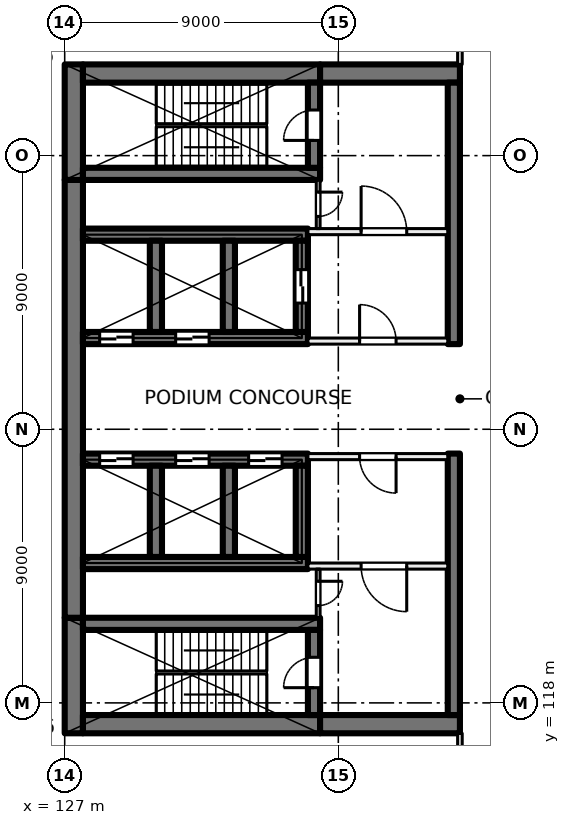
"""IFC4 building model, lengths in metres.
Left out: names, types, materials, properties, quantities, classifications, styles, units other than length and angle.
Written with IfcOpenShell. Run it as: python <this file> out.ifc"""

import sys

from ifc_helpers import new_model, si_unit, direction, frame, frame_2d, origin, place, context, subcontext, project, spatial, rectangle, extrude, element, fill, save


model = new_model("IFC4")
c1 = context("Model", 3, precision=1e-05, world=origin(), true_north=direction((0.0, 1.0)))
c2 = subcontext(c1, "Body", "Model", "MODEL_VIEW")
j1 = project(units=[si_unit("LENGTHUNIT", "METRE"), si_unit("PLANEANGLEUNIT", "RADIAN")], contexts=[c1])
p1 = place(None, origin())
s1 = spatial("IfcSite", under=j1, at=p1, CompositionType="ELEMENT")
p2 = place(p1, origin())
s2 = spatial("IfcBuilding", under=s1, at=p2, CompositionType="ELEMENT")
p3 = place(p2, frame((0.0, 0.0, 7.5)))
s3 = spatial("IfcBuildingStorey", under=s2, at=p3, CompositionType="ELEMENT", Elevation=7.5)
p4 = place(p3, frame((127.3, 117.0, 0.0), z_axis=(0.0, 0.0, 1.0), x_axis=(0.0, 1.0, 0.0)))
e1 = element("IfcWall", 1, at=p4, inside=s3, PredefinedType="SHEAR", context=c2, shape_type="SweptSolid", body=[
    extrude(rectangle(XDim=3.8, YDim=0.6, at=frame_2d((1.9, 0.0))), origin(), (0.0, 0.0, 1.0), 5.0),
])
p5 = place(p3, frame((127.3, 120.8, 0.0), z_axis=(0.0, 0.0, 1.0), x_axis=(0.0, 1.0, 0.0)))
e2 = element("IfcWall", 2, at=p5, inside=s3, PredefinedType="SHEAR", context=c2, shape_type="SweptSolid", body=[
    extrude(rectangle(XDim=14.4, YDim=0.6, at=frame_2d((7.2, 0.0))), origin(), (0.0, 0.0, 1.0), 5.0),
])
p6 = place(p3, frame((127.3, 135.2, 0.0), z_axis=(0.0, 0.0, 1.0), x_axis=(0.0, 1.0, 0.0)))
e3 = element("IfcWall", 3, at=p6, inside=s3, PredefinedType="SHEAR", context=c2, shape_type="SweptSolid", body=[
    extrude(rectangle(XDim=3.8, YDim=0.6, at=frame_2d((1.9, 0.0))), origin(), (0.0, 0.0, 1.0), 5.0),
])
for number, where, z_axis, x_axis in (
    (4, (127.6, 117.3, 0.0), (0.0, 0.0, 1.0), (1.0, 0.0, 0.0)),
    (5, (127.6, 138.7, 0.0), (0.0, 0.0, 1.0), (1.0, 0.0, 0.0)),
):
    element("IfcWall", number, at=place(p3, frame(where, z_axis=z_axis, x_axis=x_axis)), inside=s3, PredefinedType="SHEAR", context=c2, shape_type="SweptSolid", body=[
        extrude(rectangle(XDim=7.8, YDim=0.6, at=frame_2d((3.9, 0.0))), origin(), (0.0, 0.0, 1.0), 5.0),
    ])
for number, where, z_axis, x_axis in (
    (6, (135.4, 117.3, 0.0), (0.0, 0.0, 1.0), (1.0, 0.0, 0.0)),
    (7, (135.4, 138.7, 0.0), (0.0, 0.0, 1.0), (1.0, 0.0, 0.0)),
):
    element("IfcWall", number, at=place(p3, frame(where, z_axis=z_axis, x_axis=x_axis)), inside=s3, PredefinedType="SHEAR", context=c2, shape_type="SweptSolid", body=[
        extrude(rectangle(XDim=4.6, YDim=0.6, at=frame_2d((2.3, 0.0))), origin(), (0.0, 0.0, 1.0), 5.0),
    ])
p7 = place(p3, frame((127.6, 120.6, 0.0), z_axis=(0.0, 0.0, 1.0), x_axis=(1.0, 0.0, 0.0)))
e8 = element("IfcWall", 8, at=p7, inside=s3, PredefinedType="SHEAR", context=c2, shape_type="SweptSolid", body=[
    extrude(rectangle(XDim=7.8, YDim=0.4, at=frame_2d((3.9, 0.0))), origin(), (0.0, 0.0, 1.0), 5.0),
])
p8 = place(p3, frame((135.2, 117.6, 0.0), z_axis=(0.0, 0.0, 1.0), x_axis=(0.0, 1.0, 0.0)))
e9 = element("IfcWall", 9, at=p8, inside=s3, PredefinedType="SHEAR", context=c2, shape_type="SweptSolid", body=[
    extrude(rectangle(XDim=2.8, YDim=0.4, at=frame_2d((1.4, 0.0))), origin(), (0.0, 0.0, 1.0), 5.0),
])
p9 = place(p8, frame((0.9, 0.0, 0.0)))
e10 = element("IfcOpeningElement", 10, at=p9, cuts=e9, PredefinedType="OPENING", context=c2, shape_type="SweptSolid", body=[
    extrude(rectangle(XDim=1.0, YDim=2.1, at=frame_2d((0.5, 1.05))), frame((0.0, 0.21, 0.0), z_axis=(0.0, -1.0, 0.0), x_axis=(1.0, 0.0, 0.0)), (0.0, 0.0, 1.0), 0.42),
])
p10 = place(p3, frame((127.6, 135.4, 0.0), z_axis=(0.0, 0.0, 1.0), x_axis=(1.0, 0.0, 0.0)))
e11 = element("IfcWall", 11, at=p10, inside=s3, PredefinedType="SHEAR", context=c2, shape_type="SweptSolid", body=[
    extrude(rectangle(XDim=7.8, YDim=0.4, at=frame_2d((3.9, 0.0))), origin(), (0.0, 0.0, 1.0), 5.0),
])
p11 = place(p3, frame((135.2, 135.6, 0.0), z_axis=(0.0, 0.0, 1.0), x_axis=(0.0, 1.0, 0.0)))
e12 = element("IfcWall", 12, at=p11, inside=s3, PredefinedType="SHEAR", context=c2, shape_type="SweptSolid", body=[
    extrude(rectangle(XDim=2.8, YDim=0.4, at=frame_2d((1.4, 0.0))), origin(), (0.0, 0.0, 1.0), 5.0),
])
p12 = place(p11, frame((0.9, 0.0, 0.0)))
e13 = element("IfcOpeningElement", 13, at=p12, cuts=e12, PredefinedType="OPENING", context=c2, shape_type="SweptSolid", body=[
    extrude(rectangle(XDim=1.0, YDim=2.1, at=frame_2d((0.5, 1.05))), frame((0.0, 0.21, 0.0), z_axis=(0.0, -1.0, 0.0), x_axis=(1.0, 0.0, 0.0)), (0.0, 0.0, 1.0), 0.42),
])
p13 = place(p3, frame((127.6, 126.0, 0.0), z_axis=(0.0, 0.0, 1.0), x_axis=(1.0, 0.0, 0.0)))
e14 = element("IfcWall", 14, at=p13, inside=s3, PredefinedType="SHEAR", context=c2, shape_type="SweptSolid", body=[
    extrude(rectangle(XDim=7.4, YDim=0.4, at=frame_2d((3.7, 0.0))), origin(), (0.0, 0.0, 1.0), 5.0),
])
p14 = place(p13, frame((0.55, 0.0, 0.0)))
e15 = element("IfcOpeningElement", 15, at=p14, cuts=e14, PredefinedType="OPENING", context=c2, shape_type="SweptSolid", body=[
    extrude(rectangle(XDim=1.1, YDim=2.1, at=frame_2d((0.55, 1.05))), frame((0.0, 0.21, 0.0), z_axis=(0.0, -1.0, 0.0), x_axis=(1.0, 0.0, 0.0)), (0.0, 0.0, 1.0), 0.42),
])
p15 = place(p13, frame((3.05, 0.0, 0.0)))
e16 = element("IfcOpeningElement", 16, at=p15, cuts=e14, PredefinedType="OPENING", context=c2, shape_type="SweptSolid", body=[
    extrude(rectangle(XDim=1.1, YDim=2.1, at=frame_2d((0.55, 1.05))), frame((0.0, 0.21, 0.0), z_axis=(0.0, -1.0, 0.0), x_axis=(1.0, 0.0, 0.0)), (0.0, 0.0, 1.0), 0.42),
])
p16 = place(p13, frame((5.45, 0.0, 0.0)))
e17 = element("IfcOpeningElement", 17, at=p16, cuts=e14, PredefinedType="OPENING", context=c2, shape_type="SweptSolid", body=[
    extrude(rectangle(XDim=1.1, YDim=2.1, at=frame_2d((0.55, 1.05))), frame((0.0, 0.21, 0.0), z_axis=(0.0, -1.0, 0.0), x_axis=(1.0, 0.0, 0.0)), (0.0, 0.0, 1.0), 0.42),
])
p17 = place(p3, frame((127.6, 122.6, 0.0), z_axis=(0.0, 0.0, 1.0), x_axis=(1.0, 0.0, 0.0)))
e18 = element("IfcWall", 18, at=p17, inside=s3, PredefinedType="SHEAR", context=c2, shape_type="SweptSolid", body=[
    extrude(rectangle(XDim=7.4, YDim=0.4, at=frame_2d((3.7, 0.0))), origin(), (0.0, 0.0, 1.0), 5.0),
])
for number, where, z_axis, x_axis in (
    (19, (130.0, 122.8, 0.0), (0.0, 0.0, 1.0), (0.0, 1.0, 0.0)),
    (20, (132.4, 122.8, 0.0), (0.0, 0.0, 1.0), (0.0, 1.0, 0.0)),
    (21, (134.8, 122.8, 0.0), (0.0, 0.0, 1.0), (0.0, 1.0, 0.0)),
):
    element("IfcWall", number, at=place(p3, frame(where, z_axis=z_axis, x_axis=x_axis)), inside=s3, PredefinedType="SHEAR", context=c2, shape_type="SweptSolid", body=[
        extrude(rectangle(XDim=3.0, YDim=0.4, at=frame_2d((1.5, 0.0))), origin(), (0.0, 0.0, 1.0), 5.0),
    ])
p18 = place(p3, frame((127.6, 130.0, 0.0), z_axis=(0.0, 0.0, 1.0), x_axis=(1.0, 0.0, 0.0)))
e22 = element("IfcWall", 22, at=p18, inside=s3, PredefinedType="SHEAR", context=c2, shape_type="SweptSolid", body=[
    extrude(rectangle(XDim=7.4, YDim=0.4, at=frame_2d((3.7, 0.0))), origin(), (0.0, 0.0, 1.0), 5.0),
])
p19 = place(p18, frame((0.55, 0.0, 0.0)))
e23 = element("IfcOpeningElement", 23, at=p19, cuts=e22, PredefinedType="OPENING", context=c2, shape_type="SweptSolid", body=[
    extrude(rectangle(XDim=1.1, YDim=2.1, at=frame_2d((0.55, 1.05))), frame((0.0, 0.21, 0.0), z_axis=(0.0, -1.0, 0.0), x_axis=(1.0, 0.0, 0.0)), (0.0, 0.0, 1.0), 0.42),
])
p20 = place(p18, frame((3.05, 0.0, 0.0)))
e24 = element("IfcOpeningElement", 24, at=p20, cuts=e22, PredefinedType="OPENING", context=c2, shape_type="SweptSolid", body=[
    extrude(rectangle(XDim=1.1, YDim=2.1, at=frame_2d((0.55, 1.05))), frame((0.0, 0.21, 0.0), z_axis=(0.0, -1.0, 0.0), x_axis=(1.0, 0.0, 0.0)), (0.0, 0.0, 1.0), 0.42),
])
p21 = place(p3, frame((127.6, 133.4, 0.0), z_axis=(0.0, 0.0, 1.0), x_axis=(1.0, 0.0, 0.0)))
e25 = element("IfcWall", 25, at=p21, inside=s3, PredefinedType="SHEAR", context=c2, shape_type="SweptSolid", body=[
    extrude(rectangle(XDim=7.4, YDim=0.4, at=frame_2d((3.7, 0.0))), origin(), (0.0, 0.0, 1.0), 5.0),
])
for number, where, z_axis, x_axis in (
    (26, (130.0, 130.2, 0.0), (0.0, 0.0, 1.0), (0.0, 1.0, 0.0)),
    (27, (132.4, 130.2, 0.0), (0.0, 0.0, 1.0), (0.0, 1.0, 0.0)),
):
    element("IfcWall", number, at=place(p3, frame(where, z_axis=z_axis, x_axis=x_axis)), inside=s3, PredefinedType="SHEAR", context=c2, shape_type="SweptSolid", body=[
        extrude(rectangle(XDim=3.0, YDim=0.4, at=frame_2d((1.5, 0.0))), origin(), (0.0, 0.0, 1.0), 5.0),
    ])
p22 = place(p3, frame((134.8, 130.2, 0.0), z_axis=(0.0, 0.0, 1.0), x_axis=(0.0, 1.0, 0.0)))
e28 = element("IfcWall", 28, at=p22, inside=s3, PredefinedType="SHEAR", context=c2, shape_type="SweptSolid", body=[
    extrude(rectangle(XDim=3.0, YDim=0.4, at=frame_2d((1.5, 0.0))), origin(), (0.0, 0.0, 1.0), 5.0),
])
p23 = place(p22, frame((0.95, 0.0, 0.0)))
e29 = element("IfcOpeningElement", 29, at=p23, cuts=e28, PredefinedType="OPENING", context=c2, shape_type="SweptSolid", body=[
    extrude(rectangle(XDim=1.1, YDim=2.1, at=frame_2d((0.55, 1.05))), frame((0.0, 0.21, 0.0), z_axis=(0.0, -1.0, 0.0), x_axis=(1.0, 0.0, 0.0)), (0.0, 0.0, 1.0), 0.42),
])
for number, where, z_axis, x_axis in (
    (30, (139.8, 117.6, 0.0), (0.0, 0.0, 1.0), (0.0, 1.0, 0.0)),
    (31, (139.8, 129.8, 0.0), (0.0, 0.0, 1.0), (0.0, 1.0, 0.0)),
):
    element("IfcWall", number, at=place(p3, frame(where, z_axis=z_axis, x_axis=x_axis)), inside=s3, PredefinedType="SHEAR", context=c2, shape_type="SweptSolid", body=[
        extrude(rectangle(XDim=8.6, YDim=0.4, at=frame_2d((4.3, 0.0))), origin(), (0.0, 0.0, 1.0), 5.0),
    ])
p24 = place(p3, frame((135.0, 129.9, 0.0), z_axis=(0.0, 0.0, 1.0), x_axis=(1.0, 0.0, 0.0)))
e32 = element("IfcWall", 32, at=p24, inside=s3, PredefinedType="PARTITIONING", context=c2, shape_type="SweptSolid", body=[
    extrude(rectangle(XDim=4.6, YDim=0.2, at=frame_2d((2.3, 0.0))), origin(), (0.0, 0.0, 1.0), 4.6),
])
p25 = place(p24, frame((1.7, 0.0, 0.0)))
e33 = element("IfcOpeningElement", 33, at=p25, cuts=e32, PredefinedType="OPENING", context=c2, shape_type="SweptSolid", body=[
    extrude(rectangle(XDim=1.2, YDim=2.1, at=frame_2d((0.6, 1.05))), frame((0.0, 0.11, 0.0), z_axis=(0.0, -1.0, 0.0), x_axis=(1.0, 0.0, 0.0)), (0.0, 0.0, 1.0), 0.22),
])
p26 = place(p3, frame((135.0, 133.5, 0.0), z_axis=(0.0, 0.0, 1.0), x_axis=(1.0, 0.0, 0.0)))
e34 = element("IfcWall", 34, at=p26, inside=s3, PredefinedType="PARTITIONING", context=c2, shape_type="SweptSolid", body=[
    extrude(rectangle(XDim=4.6, YDim=0.2, at=frame_2d((2.3, 0.0))), origin(), (0.0, 0.0, 1.0), 4.6),
])
p27 = place(p26, frame((1.75, 0.0, 0.0)))
e35 = element("IfcOpeningElement", 35, at=p27, cuts=e34, PredefinedType="OPENING", context=c2, shape_type="SweptSolid", body=[
    extrude(rectangle(XDim=1.5, YDim=2.1, at=frame_2d((0.75, 1.05))), frame((0.0, 0.11, 0.0), z_axis=(0.0, -1.0, 0.0), x_axis=(1.0, 0.0, 0.0)), (0.0, 0.0, 1.0), 0.22),
])
p28 = place(p3, frame((135.337, 135.2, 0.0), z_axis=(0.0, 0.0, 1.0), x_axis=(0.0, -1.0, 0.0)))
e36 = element("IfcWall", 36, at=p28, inside=s3, PredefinedType="PARTITIONING", context=c2, shape_type="SweptSolid", body=[
    extrude(rectangle(XDim=1.6, YDim=0.125, at=frame_2d((0.8, 0.0))), origin(), (0.0, 0.0, 1.0), 4.6),
])
p29 = place(p28, frame((0.4, 0.0, 0.0)))
e37 = element("IfcOpeningElement", 37, at=p29, cuts=e36, PredefinedType="OPENING", context=c2, shape_type="SweptSolid", body=[
    extrude(rectangle(XDim=0.8, YDim=2.1, at=frame_2d((0.4, 1.05))), frame((0.0, 0.073, 0.0), z_axis=(0.0, -1.0, 0.0), x_axis=(1.0, 0.0, 0.0)), (0.0, 0.0, 1.0), 0.145),
])
p30 = place(p3, frame((139.6, 126.1, 0.0), z_axis=(0.0, 0.0, 1.0), x_axis=(-1.0, 0.0, 0.0)))
e38 = element("IfcWall", 38, at=p30, inside=s3, PredefinedType="PARTITIONING", context=c2, shape_type="SweptSolid", body=[
    extrude(rectangle(XDim=4.6, YDim=0.2, at=frame_2d((2.3, 0.0))), origin(), (0.0, 0.0, 1.0), 4.6),
])
p31 = place(p30, frame((1.7, 0.0, 0.0)))
e39 = element("IfcOpeningElement", 39, at=p31, cuts=e38, PredefinedType="OPENING", context=c2, shape_type="SweptSolid", body=[
    extrude(rectangle(XDim=1.2, YDim=2.1, at=frame_2d((0.6, 1.05))), frame((0.0, 0.11, 0.0), z_axis=(0.0, -1.0, 0.0), x_axis=(1.0, 0.0, 0.0)), (0.0, 0.0, 1.0), 0.22),
])
p32 = place(p3, frame((139.6, 122.5, 0.0), z_axis=(0.0, 0.0, 1.0), x_axis=(-1.0, 0.0, 0.0)))
e40 = element("IfcWall", 40, at=p32, inside=s3, PredefinedType="PARTITIONING", context=c2, shape_type="SweptSolid", body=[
    extrude(rectangle(XDim=4.6, YDim=0.2, at=frame_2d((2.3, 0.0))), origin(), (0.0, 0.0, 1.0), 4.6),
])
p33 = place(p32, frame((1.35, 0.0, 0.0)))
e41 = element("IfcOpeningElement", 41, at=p33, cuts=e40, PredefinedType="OPENING", context=c2, shape_type="SweptSolid", body=[
    extrude(rectangle(XDim=1.5, YDim=2.1, at=frame_2d((0.75, 1.05))), frame((0.0, 0.11, 0.0), z_axis=(0.0, -1.0, 0.0), x_axis=(1.0, 0.0, 0.0)), (0.0, 0.0, 1.0), 0.22),
])
p34 = place(p3, frame((135.337, 122.4, 0.0), z_axis=(0.0, 0.0, 1.0), x_axis=(0.0, -1.0, 0.0)))
e42 = element("IfcWall", 42, at=p34, inside=s3, PredefinedType="PARTITIONING", context=c2, shape_type="SweptSolid", body=[
    extrude(rectangle(XDim=1.6, YDim=0.125, at=frame_2d((0.8, 0.0))), origin(), (0.0, 0.0, 1.0), 4.6),
])
p35 = place(p34, frame((0.4, 0.0, 0.0)))
e43 = element("IfcOpeningElement", 43, at=p35, cuts=e42, PredefinedType="OPENING", context=c2, shape_type="SweptSolid", body=[
    extrude(rectangle(XDim=0.8, YDim=2.1, at=frame_2d((0.4, 1.05))), frame((0.0, 0.073, 0.0), z_axis=(0.0, -1.0, 0.0), x_axis=(1.0, 0.0, 0.0)), (0.0, 0.0, 1.0), 0.145),
])
p36 = place(p3, frame((140.0, 102.925, 0.0), z_axis=(0.0, 0.0, 1.0), x_axis=(0.0, 1.0, 0.0)))
e44 = element("IfcWall", 44, at=p36, inside=s3, PredefinedType="PARTITIONING", context=c2, shape_type="SweptSolid", body=[
    extrude(rectangle(XDim=14.075, YDim=0.15, at=frame_2d((7.038, 0.0))), origin(), (0.0, 0.0, 1.0), 4.6),
])
p37 = place(p36, frame((10.675, 0.0, 0.0)))
e45 = element("IfcOpeningElement", 45, at=p37, cuts=e44, PredefinedType="OPENING", context=c2, shape_type="SweptSolid", body=[
    extrude(rectangle(XDim=1.8, YDim=2.1, at=frame_2d((0.9, 1.05))), frame((0.0, 0.085, 0.0), z_axis=(0.0, -1.0, 0.0), x_axis=(1.0, 0.0, 0.0)), (0.0, 0.0, 1.0), 0.17),
])
p38 = place(p3, frame((140.0, 139.0, 0.0), z_axis=(0.0, 0.0, 1.0), x_axis=(0.0, 1.0, 0.0)))
e46 = element("IfcWall", 46, at=p38, inside=s3, PredefinedType="PARTITIONING", context=c2, shape_type="SweptSolid", body=[
    extrude(rectangle(XDim=14.4, YDim=0.15, at=frame_2d((7.2, 0.0))), origin(), (0.0, 0.0, 1.0), 4.6),
])
p39 = place(p19, origin())
e47 = element("IfcDoor", 47, at=p39, inside=s3, OperationType="DOUBLE_DOOR_SLIDING", PredefinedType="DOOR", context=c2, shape_type="SweptSolid", body=[
    extrude(rectangle(XDim=1.1, YDim=2.1, at=frame_2d((0.55, 1.05))), frame((0.0, 0.025, 0.0), z_axis=(0.0, -1.0, 0.0), x_axis=(1.0, 0.0, 0.0)), (0.0, 0.0, 1.0), 0.05),
])
fill(e23, e47)
p40 = place(p20, origin())
e48 = element("IfcDoor", 48, at=p40, inside=s3, OperationType="DOUBLE_DOOR_SLIDING", PredefinedType="DOOR", context=c2, shape_type="SweptSolid", body=[
    extrude(rectangle(XDim=1.1, YDim=2.1, at=frame_2d((0.55, 1.05))), frame((0.0, 0.025, 0.0), z_axis=(0.0, -1.0, 0.0), x_axis=(1.0, 0.0, 0.0)), (0.0, 0.0, 1.0), 0.05),
])
fill(e24, e48)
p41 = place(p14, origin())
e49 = element("IfcDoor", 49, at=p41, inside=s3, OperationType="DOUBLE_DOOR_SLIDING", PredefinedType="DOOR", context=c2, shape_type="SweptSolid", body=[
    extrude(rectangle(XDim=1.1, YDim=2.1, at=frame_2d((0.55, 1.05))), frame((0.0, 0.025, 0.0), z_axis=(0.0, -1.0, 0.0), x_axis=(1.0, 0.0, 0.0)), (0.0, 0.0, 1.0), 0.05),
])
fill(e15, e49)
p42 = place(p15, origin())
e50 = element("IfcDoor", 50, at=p42, inside=s3, OperationType="DOUBLE_DOOR_SLIDING", PredefinedType="DOOR", context=c2, shape_type="SweptSolid", body=[
    extrude(rectangle(XDim=1.1, YDim=2.1, at=frame_2d((0.55, 1.05))), frame((0.0, 0.025, 0.0), z_axis=(0.0, -1.0, 0.0), x_axis=(1.0, 0.0, 0.0)), (0.0, 0.0, 1.0), 0.05),
])
fill(e16, e50)
p43 = place(p16, origin())
e51 = element("IfcDoor", 51, at=p43, inside=s3, OperationType="DOUBLE_DOOR_SLIDING", PredefinedType="DOOR", context=c2, shape_type="SweptSolid", body=[
    extrude(rectangle(XDim=1.1, YDim=2.1, at=frame_2d((0.55, 1.05))), frame((0.0, 0.025, 0.0), z_axis=(0.0, -1.0, 0.0), x_axis=(1.0, 0.0, 0.0)), (0.0, 0.0, 1.0), 0.05),
])
fill(e17, e51)
p44 = place(p25, origin())
e52 = element("IfcDoor", 52, at=p44, inside=s3, OperationType="DOUBLE_DOOR_SINGLE_SWING", PredefinedType="DOOR", context=c2, shape_type="SweptSolid", body=[
    extrude(rectangle(XDim=1.2, YDim=2.1, at=frame_2d((0.6, 1.05))), frame((0.0, 0.025, 0.0), z_axis=(0.0, -1.0, 0.0), x_axis=(1.0, 0.0, 0.0)), (0.0, 0.0, 1.0), 0.05),
])
fill(e33, e52)
p45 = place(p27, origin())
e53 = element("IfcDoor", 53, at=p45, inside=s3, OperationType="DOUBLE_DOOR_SINGLE_SWING", PredefinedType="DOOR", context=c2, shape_type="SweptSolid", body=[
    extrude(rectangle(XDim=1.5, YDim=2.1, at=frame_2d((0.75, 1.05))), frame((0.0, 0.025, 0.0), z_axis=(0.0, -1.0, 0.0), x_axis=(1.0, 0.0, 0.0)), (0.0, 0.0, 1.0), 0.05),
])
fill(e35, e53)
p46 = place(p12, origin())
e54 = element("IfcDoor", 54, at=p46, inside=s3, OperationType="SINGLE_SWING_LEFT", PredefinedType="DOOR", context=c2, shape_type="SweptSolid", body=[
    extrude(rectangle(XDim=1.0, YDim=2.1, at=frame_2d((0.5, 1.05))), frame((0.0, 0.025, 0.0), z_axis=(0.0, -1.0, 0.0), x_axis=(1.0, 0.0, 0.0)), (0.0, 0.0, 1.0), 0.05),
])
fill(e13, e54)
p47 = place(p29, origin())
e55 = element("IfcDoor", 55, at=p47, inside=s3, OperationType="SINGLE_SWING_RIGHT", PredefinedType="DOOR", context=c2, shape_type="SweptSolid", body=[
    extrude(rectangle(XDim=0.8, YDim=2.1, at=frame_2d((0.4, 1.05))), frame((0.0, 0.025, 0.0), z_axis=(0.0, -1.0, 0.0), x_axis=(1.0, 0.0, 0.0)), (0.0, 0.0, 1.0), 0.05),
])
fill(e37, e55)
p48 = place(p31, origin())
e56 = element("IfcDoor", 56, at=p48, inside=s3, OperationType="DOUBLE_DOOR_SINGLE_SWING", PredefinedType="DOOR", context=c2, shape_type="SweptSolid", body=[
    extrude(rectangle(XDim=1.2, YDim=2.1, at=frame_2d((0.6, 1.05))), frame((0.0, 0.025, 0.0), z_axis=(0.0, -1.0, 0.0), x_axis=(1.0, 0.0, 0.0)), (0.0, 0.0, 1.0), 0.05),
])
fill(e39, e56)
p49 = place(p33, origin())
e57 = element("IfcDoor", 57, at=p49, inside=s3, OperationType="DOUBLE_DOOR_SINGLE_SWING", PredefinedType="DOOR", context=c2, shape_type="SweptSolid", body=[
    extrude(rectangle(XDim=1.5, YDim=2.1, at=frame_2d((0.75, 1.05))), frame((0.0, 0.025, 0.0), z_axis=(0.0, -1.0, 0.0), x_axis=(1.0, 0.0, 0.0)), (0.0, 0.0, 1.0), 0.05),
])
fill(e41, e57)
p50 = place(p9, origin())
e58 = element("IfcDoor", 58, at=p50, inside=s3, OperationType="SINGLE_SWING_RIGHT", PredefinedType="DOOR", context=c2, shape_type="SweptSolid", body=[
    extrude(rectangle(XDim=1.0, YDim=2.1, at=frame_2d((0.5, 1.05))), frame((0.0, 0.025, 0.0), z_axis=(0.0, -1.0, 0.0), x_axis=(1.0, 0.0, 0.0)), (0.0, 0.0, 1.0), 0.05),
])
fill(e10, e58)
p51 = place(p35, origin())
e59 = element("IfcDoor", 59, at=p51, inside=s3, OperationType="SINGLE_SWING_LEFT", PredefinedType="DOOR", context=c2, shape_type="SweptSolid", body=[
    extrude(rectangle(XDim=0.8, YDim=2.1, at=frame_2d((0.4, 1.05))), frame((0.0, 0.025, 0.0), z_axis=(0.0, -1.0, 0.0), x_axis=(1.0, 0.0, 0.0)), (0.0, 0.0, 1.0), 0.05),
])
fill(e43, e59)
p52 = place(p23, origin())
e60 = element("IfcDoor", 60, at=p52, inside=s3, OperationType="DOUBLE_DOOR_SLIDING", PredefinedType="DOOR", context=c2, shape_type="SweptSolid", body=[
    extrude(rectangle(XDim=1.1, YDim=2.1, at=frame_2d((0.55, 1.05))), frame((0.0, 0.025, 0.0), z_axis=(0.0, -1.0, 0.0), x_axis=(1.0, 0.0, 0.0)), (0.0, 0.0, 1.0), 0.05),
])
fill(e29, e60)
save(model, sys.argv[1])
